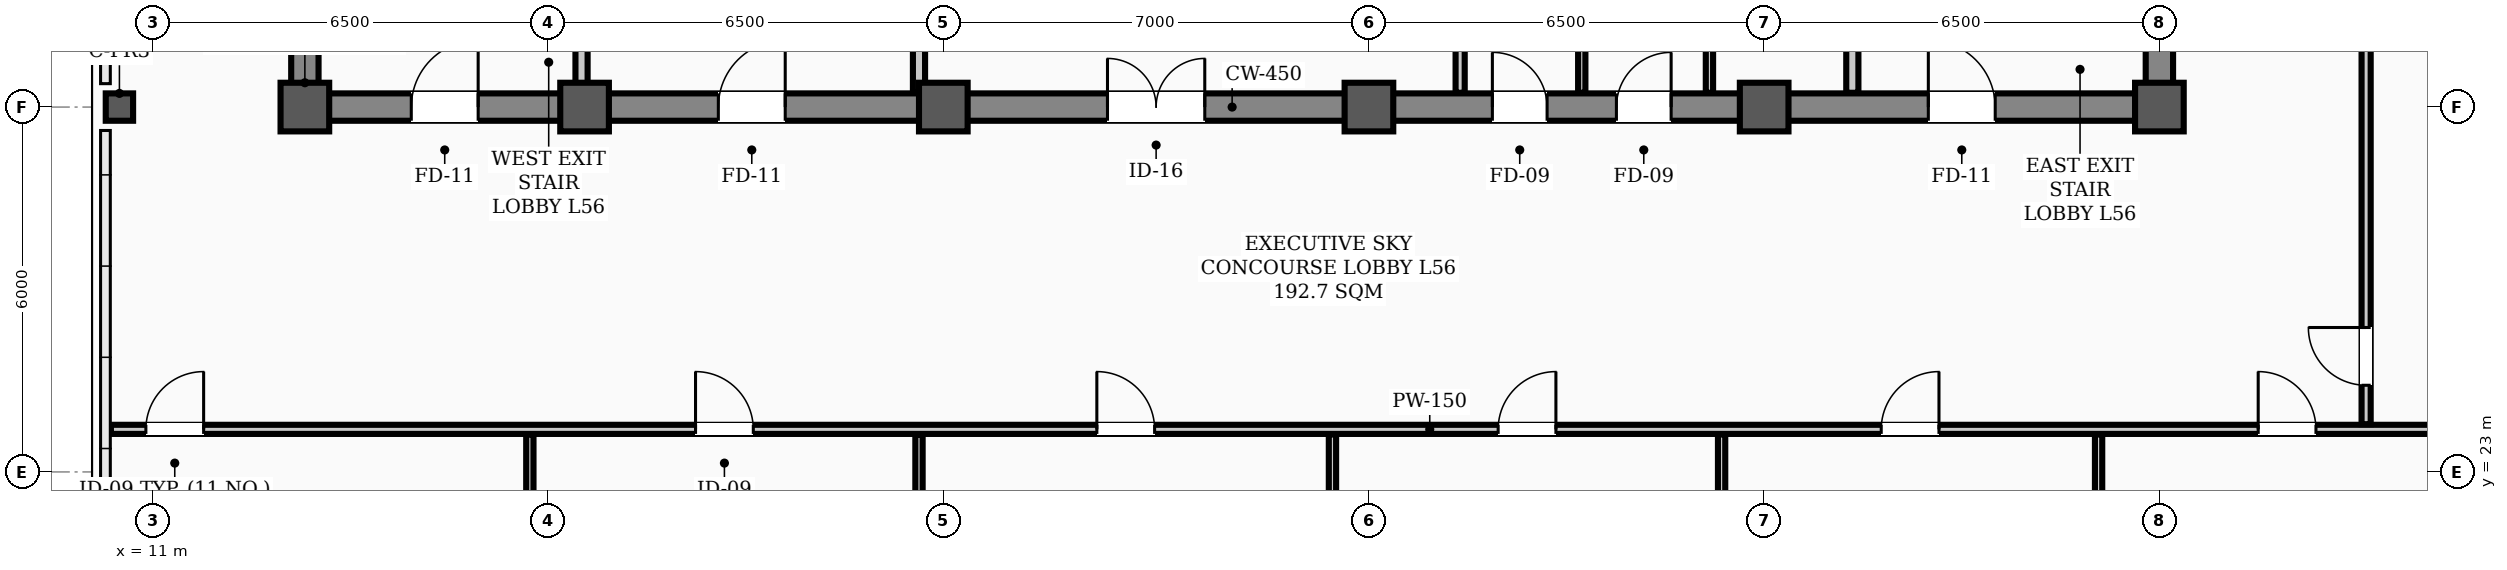
"""IFC4 building model, lengths in metres.
Left out: names, types, materials, properties, quantities, classifications, styles, units other than length and angle.
Written with IfcOpenShell. Run it as: python <this file> out.ifc"""

import sys

from ifc_helpers import new_model, si_unit, direction, frame, frame_2d, origin, origin_2d, place, context, subcontext, project, spatial, rectangle, hollow_rectangle, extrude, element, fill, save


model = new_model("IFC4")
c1 = context("Model", 3, precision=1e-05, world=origin(), true_north=direction((0.0, 1.0)))
c2 = subcontext(c1, "Body", "Model", "MODEL_VIEW")
j1 = project(units=[si_unit("LENGTHUNIT", "METRE"), si_unit("PLANEANGLEUNIT", "RADIAN")], contexts=[c1])
p1 = place(None, origin())
s1 = spatial("IfcSite", under=j1, at=p1, CompositionType="ELEMENT")
p2 = place(p1, origin())
s2 = spatial("IfcBuilding", under=s1, at=p2, CompositionType="ELEMENT")
p3 = place(p2, frame((0.0, 0.0, 226.7)))
s3 = spatial("IfcBuildingStorey", under=s2, at=p3, CompositionType="ELEMENT", Elevation=226.7)
for number, where, z_axis, x_axis in (
    (1, (13.5, 29.0, 0.0), (0.0, 0.0, 1.0), (1.0, 0.0, 0.0)),
    (2, (18.1, 29.0, 0.0), (0.0, 0.0, 1.0), (1.0, 0.0, 0.0)),
    (3, (24.0, 29.0, 0.0), (0.0, 0.0, 1.0), (1.0, 0.0, 0.0)),
    (4, (31.0, 29.0, 0.0), (0.0, 0.0, 1.0), (1.0, 0.0, 0.0)),
    (5, (37.5, 29.0, 0.0), (0.0, 0.0, 1.0), (1.0, 0.0, 0.0)),
    (6, (44.0, 29.0, 0.0), (0.0, 0.0, 1.0), (1.0, 0.0, 0.0)),
):
    element("IfcColumn", number, at=place(p3, frame(where, z_axis=z_axis, x_axis=x_axis)), inside=s3, PredefinedType="COLUMN", context=c2, shape_type="SweptSolid", body=[
        extrude(hollow_rectangle(XDim=0.8, YDim=0.8, WallThickness=0.032, InnerFilletRadius=0.016, OuterFilletRadius=0.048, at=origin_2d()), origin(), (0.0, 0.0, 1.0), 3.9),
    ])
p4 = place(p3, frame((10.45, 29.0, 0.0), z_axis=(0.0, 0.0, 1.0), x_axis=(1.0, 0.0, 0.0)))
e7 = element("IfcColumn", 7, at=p4, inside=s3, PredefinedType="COLUMN", context=c2, shape_type="SweptSolid", body=[
    extrude(hollow_rectangle(XDim=0.45, YDim=0.45, WallThickness=0.022, InnerFilletRadius=0.022, OuterFilletRadius=0.044, at=origin_2d()), origin(), (0.0, 0.0, 1.0), 3.9),
])
p5 = place(p3, frame((13.5, 29.0, 0.0), z_axis=(0.0, 0.0, 1.0), x_axis=(1.0, 0.0, 0.0)))
e8 = element("IfcWall", 8, at=p5, inside=s3, PredefinedType="SHEAR", context=c2, shape_type="SweptSolid", body=[
    extrude(rectangle(XDim=30.5, YDim=0.45, at=frame_2d((15.25, 0.0))), origin(), (0.0, 0.0, 1.0), 3.66),
])
p6 = place(p5, frame((1.75, 0.0, 0.0)))
e9 = element("IfcOpeningElement", 9, at=p6, cuts=e8, PredefinedType="OPENING", context=c2, shape_type="SweptSolid", body=[
    extrude(rectangle(XDim=1.1, YDim=2.08, at=frame_2d((0.55, 1.04))), frame((0.0, 0.235, 0.0), z_axis=(0.0, -1.0, 0.0), x_axis=(1.0, 0.0, 0.0)), (0.0, 0.0, 1.0), 0.47),
])
p7 = place(p5, frame((26.7, 0.0, 0.0)))
e10 = element("IfcOpeningElement", 10, at=p7, cuts=e8, PredefinedType="OPENING", context=c2, shape_type="SweptSolid", body=[
    extrude(rectangle(XDim=1.1, YDim=2.08, at=frame_2d((0.55, 1.04))), frame((0.0, 0.235, 0.0), z_axis=(0.0, -1.0, 0.0), x_axis=(1.0, 0.0, 0.0)), (0.0, 0.0, 1.0), 0.47),
])
p8 = place(p5, frame((6.8, 0.0, 0.0)))
e11 = element("IfcOpeningElement", 11, at=p8, cuts=e8, PredefinedType="OPENING", context=c2, shape_type="SweptSolid", body=[
    extrude(rectangle(XDim=1.1, YDim=2.08, at=frame_2d((0.55, 1.04))), frame((0.0, 0.235, 0.0), z_axis=(0.0, -1.0, 0.0), x_axis=(1.0, 0.0, 0.0)), (0.0, 0.0, 1.0), 0.47),
])
p9 = place(p5, frame((13.2, 0.0, 0.0)))
e12 = element("IfcOpeningElement", 12, at=p9, cuts=e8, PredefinedType="OPENING", context=c2, shape_type="SweptSolid", body=[
    extrude(rectangle(XDim=1.6, YDim=2.08, at=frame_2d((0.8, 1.04))), frame((0.0, 0.235, 0.0), z_axis=(0.0, -1.0, 0.0), x_axis=(1.0, 0.0, 0.0)), (0.0, 0.0, 1.0), 0.47),
])
p10 = place(p5, frame((19.53, 0.0, 0.0)))
e13 = element("IfcOpeningElement", 13, at=p10, cuts=e8, PredefinedType="OPENING", context=c2, shape_type="SweptSolid", body=[
    extrude(rectangle(XDim=0.9, YDim=2.08, at=frame_2d((0.45, 1.04))), frame((0.0, 0.235, 0.0), z_axis=(0.0, -1.0, 0.0), x_axis=(1.0, 0.0, 0.0)), (0.0, 0.0, 1.0), 0.47),
])
p11 = place(p5, frame((21.57, 0.0, 0.0)))
e14 = element("IfcOpeningElement", 14, at=p11, cuts=e8, PredefinedType="OPENING", context=c2, shape_type="SweptSolid", body=[
    extrude(rectangle(XDim=0.9, YDim=2.08, at=frame_2d((0.45, 1.04))), frame((0.0, 0.235, 0.0), z_axis=(0.0, -1.0, 0.0), x_axis=(1.0, 0.0, 0.0)), (0.0, 0.0, 1.0), 0.47),
])
for number, where, z_axis, x_axis in (
    (15, (13.5, 29.35, 0.0), (0.0, 0.0, 1.0), (0.0, 1.0, 0.0)),
    (16, (44.0, 29.35, 0.0), (0.0, 0.0, 1.0), (0.0, 1.0, 0.0)),
):
    element("IfcWall", number, at=place(p3, frame(where, z_axis=z_axis, x_axis=x_axis)), inside=s3, PredefinedType="SHEAR", context=c2, shape_type="SweptSolid", body=[
        extrude(rectangle(XDim=8.6, YDim=0.45, at=frame_2d((4.3, 0.0))), origin(), (0.0, 0.0, 1.0), 3.66),
    ])
p12 = place(p3, frame((10.31, 23.7, 0.0), z_axis=(0.0, 0.0, 1.0), x_axis=(1.0, 0.0, 0.0)))
e17 = element("IfcWall", 17, at=p12, inside=s3, PredefinedType="PARTITIONING", context=c2, shape_type="SweptSolid", body=[
    extrude(rectangle(XDim=43.38, YDim=0.15, at=frame_2d((21.69, 0.0))), origin(), (0.0, 0.0, 1.0), 2.24),
])
p13 = place(p12, frame((0.575, 0.0, 0.0)))
e18 = element("IfcOpeningElement", 18, at=p13, cuts=e17, PredefinedType="OPENING", context=c2, shape_type="SweptSolid", body=[
    extrude(rectangle(XDim=0.95, YDim=2.08, at=frame_2d((0.475, 1.04))), frame((0.0, 0.085, 0.0), z_axis=(0.0, -1.0, 0.0), x_axis=(1.0, 0.0, 0.0)), (0.0, 0.0, 1.0), 0.17),
])
p14 = place(p12, frame((9.615, 0.0, 0.0)))
e19 = element("IfcOpeningElement", 19, at=p14, cuts=e17, PredefinedType="OPENING", context=c2, shape_type="SweptSolid", body=[
    extrude(rectangle(XDim=0.95, YDim=2.08, at=frame_2d((0.475, 1.04))), frame((0.0, 0.085, 0.0), z_axis=(0.0, -1.0, 0.0), x_axis=(1.0, 0.0, 0.0)), (0.0, 0.0, 1.0), 0.17),
])
p15 = place(p12, frame((16.215, 0.0, 0.0)))
e20 = element("IfcOpeningElement", 20, at=p15, cuts=e17, PredefinedType="OPENING", context=c2, shape_type="SweptSolid", body=[
    extrude(rectangle(XDim=0.95, YDim=2.08, at=frame_2d((0.475, 1.04))), frame((0.0, 0.085, 0.0), z_axis=(0.0, -1.0, 0.0), x_axis=(1.0, 0.0, 0.0)), (0.0, 0.0, 1.0), 0.17),
])
p16 = place(p12, frame((22.815, 0.0, 0.0)))
e21 = element("IfcOpeningElement", 21, at=p16, cuts=e17, PredefinedType="OPENING", context=c2, shape_type="SweptSolid", body=[
    extrude(rectangle(XDim=0.95, YDim=2.08, at=frame_2d((0.475, 1.04))), frame((0.0, 0.085, 0.0), z_axis=(0.0, -1.0, 0.0), x_axis=(1.0, 0.0, 0.0)), (0.0, 0.0, 1.0), 0.17),
])
p17 = place(p12, frame((29.115, 0.0, 0.0)))
e22 = element("IfcOpeningElement", 22, at=p17, cuts=e17, PredefinedType="OPENING", context=c2, shape_type="SweptSolid", body=[
    extrude(rectangle(XDim=0.95, YDim=2.08, at=frame_2d((0.475, 1.04))), frame((0.0, 0.085, 0.0), z_axis=(0.0, -1.0, 0.0), x_axis=(1.0, 0.0, 0.0)), (0.0, 0.0, 1.0), 0.17),
])
p18 = place(p12, frame((35.315, 0.0, 0.0)))
e23 = element("IfcOpeningElement", 23, at=p18, cuts=e17, PredefinedType="OPENING", context=c2, shape_type="SweptSolid", body=[
    extrude(rectangle(XDim=0.95, YDim=2.08, at=frame_2d((0.475, 1.04))), frame((0.0, 0.085, 0.0), z_axis=(0.0, -1.0, 0.0), x_axis=(1.0, 0.0, 0.0)), (0.0, 0.0, 1.0), 0.17),
])
for number, where, z_axis, x_axis in (
    (24, (18.05, 29.235, 0.0), (0.0, 0.0, 1.0), (0.0, 1.0, 0.0)),
    (25, (38.95, 29.235, 0.0), (0.0, 0.0, 1.0), (0.0, 1.0, 0.0)),
):
    element("IfcWall", number, at=place(p3, frame(where, z_axis=z_axis, x_axis=x_axis)), inside=s3, PredefinedType="STANDARD", context=c2, shape_type="SweptSolid", body=[
        extrude(rectangle(XDim=1.065, YDim=0.2, at=frame_2d((0.532, 0.0))), origin(), (0.0, 0.0, 1.0), 2.24),
    ])
p19 = place(p3, frame((23.6, 29.235, 0.0), z_axis=(0.0, 0.0, 1.0), x_axis=(0.0, 1.0, 0.0)))
e26 = element("IfcWall", 26, at=p19, inside=s3, PredefinedType="STANDARD", context=c2, shape_type="SweptSolid", body=[
    extrude(rectangle(XDim=5.465, YDim=0.2, at=frame_2d((2.732, 0.0))), origin(), (0.0, 0.0, 1.0), 2.24),
])
p20 = place(p3, frame((32.5, 29.235, 0.0), z_axis=(0.0, 0.0, 1.0), x_axis=(0.0, 1.0, 0.0)))
e27 = element("IfcWall", 27, at=p20, inside=s3, PredefinedType="PARTITIONING", context=c2, shape_type="SweptSolid", body=[
    extrude(rectangle(XDim=2.53, YDim=0.15, at=frame_2d((1.265, 0.0))), origin(), (0.0, 0.0, 1.0), 2.24),
])
for number, where, z_axis, x_axis in (
    (28, (36.6, 29.235, 0.0), (0.0, 0.0, 1.0), (0.0, 1.0, 0.0)),
    (29, (34.5, 29.235, 0.0), (0.0, 0.0, 1.0), (0.0, 1.0, 0.0)),
):
    element("IfcWall", number, at=place(p3, frame(where, z_axis=z_axis, x_axis=x_axis)), inside=s3, PredefinedType="PARTITIONING", context=c2, shape_type="SweptSolid", body=[
        extrude(rectangle(XDim=2.53, YDim=0.12, at=frame_2d((1.265, 0.0))), origin(), (0.0, 0.0, 1.0), 2.24),
    ])
p21 = place(p3, frame((47.4, 23.785, 0.0), z_axis=(0.0, 0.0, 1.0), x_axis=(0.0, 1.0, 0.0)))
e30 = element("IfcWall", 30, at=p21, inside=s3, PredefinedType="PARTITIONING", context=c2, shape_type="SweptSolid", body=[
    extrude(rectangle(XDim=13.13, YDim=0.15, at=frame_2d((6.565, 0.0))), origin(), (0.0, 0.0, 1.0), 2.24),
])
p22 = place(p21, frame((0.64, 0.0, 0.0)))
e31 = element("IfcOpeningElement", 31, at=p22, cuts=e30, PredefinedType="OPENING", context=c2, shape_type="SweptSolid", body=[
    extrude(rectangle(XDim=0.95, YDim=2.08, at=frame_2d((0.475, 1.04))), frame((0.0, 0.085, 0.0), z_axis=(0.0, -1.0, 0.0), x_axis=(1.0, 0.0, 0.0)), (0.0, 0.0, 1.0), 0.17),
])
p23 = place(p21, frame((10.44, 0.0, 0.0)))
e32 = element("IfcOpeningElement", 32, at=p23, cuts=e30, PredefinedType="OPENING", context=c2, shape_type="SweptSolid", body=[
    extrude(rectangle(XDim=0.95, YDim=2.08, at=frame_2d((0.475, 1.04))), frame((0.0, 0.085, 0.0), z_axis=(0.0, -1.0, 0.0), x_axis=(1.0, 0.0, 0.0)), (0.0, 0.0, 1.0), 0.17),
])
p24 = place(p3, frame((17.2, 11.56, 0.0), z_axis=(0.0, 0.0, 1.0), x_axis=(0.0, 1.0, 0.0)))
e33 = element("IfcWall", 33, at=p24, inside=s3, PredefinedType="PARTITIONING", context=c2, shape_type="SweptSolid", body=[
    extrude(rectangle(XDim=12.055, YDim=0.12, at=frame_2d((6.027, 0.0))), origin(), (0.0, 0.0, 1.0), 2.24),
])
p25 = place(p3, frame((23.6, 13.32, 0.0), z_axis=(0.0, 0.0, 1.0), x_axis=(0.0, 1.0, 0.0)))
e34 = element("IfcWall", 34, at=p25, inside=s3, PredefinedType="PARTITIONING", context=c2, shape_type="SweptSolid", body=[
    extrude(rectangle(XDim=10.295, YDim=0.12, at=frame_2d((5.147, 0.0))), origin(), (0.0, 0.0, 1.0), 2.24),
])
for number, where, z_axis, x_axis in (
    (35, (30.4, 11.56, 0.0), (0.0, 0.0, 1.0), (0.0, 1.0, 0.0)),
    (36, (36.8, 11.56, 0.0), (0.0, 0.0, 1.0), (0.0, 1.0, 0.0)),
    (37, (43.0, 11.56, 0.0), (0.0, 0.0, 1.0), (0.0, 1.0, 0.0)),
):
    element("IfcWall", number, at=place(p3, frame(where, z_axis=z_axis, x_axis=x_axis)), inside=s3, PredefinedType="PARTITIONING", context=c2, shape_type="SweptSolid", body=[
        extrude(rectangle(XDim=12.055, YDim=0.12, at=frame_2d((6.027, 0.0))), origin(), (0.0, 0.0, 1.0), 2.24),
    ])
p26 = place(p6, origin())
e38 = element("IfcDoor", 38, at=p26, inside=s3, OperationType="SINGLE_SWING_RIGHT", PredefinedType="DOOR", context=c2, shape_type="SweptSolid", body=[
    extrude(rectangle(XDim=1.1, YDim=2.08, at=frame_2d((0.55, 1.04))), frame((0.0, 0.025, 0.0), z_axis=(0.0, -1.0, 0.0), x_axis=(1.0, 0.0, 0.0)), (0.0, 0.0, 1.0), 0.05),
])
fill(e9, e38)
p27 = place(p7, origin())
e39 = element("IfcDoor", 39, at=p27, inside=s3, OperationType="SINGLE_SWING_LEFT", PredefinedType="DOOR", context=c2, shape_type="SweptSolid", body=[
    extrude(rectangle(XDim=1.1, YDim=2.08, at=frame_2d((0.55, 1.04))), frame((0.0, 0.025, 0.0), z_axis=(0.0, -1.0, 0.0), x_axis=(1.0, 0.0, 0.0)), (0.0, 0.0, 1.0), 0.05),
])
fill(e10, e39)
p28 = place(p8, origin())
e40 = element("IfcDoor", 40, at=p28, inside=s3, OperationType="SINGLE_SWING_RIGHT", PredefinedType="DOOR", context=c2, shape_type="SweptSolid", body=[
    extrude(rectangle(XDim=1.1, YDim=2.08, at=frame_2d((0.55, 1.04))), frame((0.0, 0.025, 0.0), z_axis=(0.0, -1.0, 0.0), x_axis=(1.0, 0.0, 0.0)), (0.0, 0.0, 1.0), 0.05),
])
fill(e11, e40)
p29 = place(p9, origin())
e41 = element("IfcDoor", 41, at=p29, inside=s3, OperationType="DOUBLE_DOOR_SINGLE_SWING", PredefinedType="DOOR", context=c2, shape_type="SweptSolid", body=[
    extrude(rectangle(XDim=1.6, YDim=2.08, at=frame_2d((0.8, 1.04))), frame((0.0, 0.025, 0.0), z_axis=(0.0, -1.0, 0.0), x_axis=(1.0, 0.0, 0.0)), (0.0, 0.0, 1.0), 0.05),
])
fill(e12, e41)
p30 = place(p10, origin())
e42 = element("IfcDoor", 42, at=p30, inside=s3, OperationType="SINGLE_SWING_LEFT", PredefinedType="DOOR", context=c2, shape_type="SweptSolid", body=[
    extrude(rectangle(XDim=0.9, YDim=2.08, at=frame_2d((0.45, 1.04))), frame((0.0, 0.025, 0.0), z_axis=(0.0, -1.0, 0.0), x_axis=(1.0, 0.0, 0.0)), (0.0, 0.0, 1.0), 0.05),
])
fill(e13, e42)
p31 = place(p11, origin())
e43 = element("IfcDoor", 43, at=p31, inside=s3, OperationType="SINGLE_SWING_RIGHT", PredefinedType="DOOR", context=c2, shape_type="SweptSolid", body=[
    extrude(rectangle(XDim=0.9, YDim=2.08, at=frame_2d((0.45, 1.04))), frame((0.0, 0.025, 0.0), z_axis=(0.0, -1.0, 0.0), x_axis=(1.0, 0.0, 0.0)), (0.0, 0.0, 1.0), 0.05),
])
fill(e14, e43)
p32 = place(p13, origin())
e44 = element("IfcDoor", 44, at=p32, inside=s3, OperationType="SINGLE_SWING_RIGHT", PredefinedType="DOOR", context=c2, shape_type="SweptSolid", body=[
    extrude(rectangle(XDim=0.95, YDim=2.08, at=frame_2d((0.475, 1.04))), frame((0.0, 0.025, 0.0), z_axis=(0.0, -1.0, 0.0), x_axis=(1.0, 0.0, 0.0)), (0.0, 0.0, 1.0), 0.05),
])
fill(e18, e44)
p33 = place(p14, origin())
e45 = element("IfcDoor", 45, at=p33, inside=s3, OperationType="SINGLE_SWING_LEFT", PredefinedType="DOOR", context=c2, shape_type="SweptSolid", body=[
    extrude(rectangle(XDim=0.95, YDim=2.08, at=frame_2d((0.475, 1.04))), frame((0.0, 0.025, 0.0), z_axis=(0.0, -1.0, 0.0), x_axis=(1.0, 0.0, 0.0)), (0.0, 0.0, 1.0), 0.05),
])
fill(e19, e45)
p34 = place(p15, origin())
e46 = element("IfcDoor", 46, at=p34, inside=s3, OperationType="SINGLE_SWING_LEFT", PredefinedType="DOOR", context=c2, shape_type="SweptSolid", body=[
    extrude(rectangle(XDim=0.95, YDim=2.08, at=frame_2d((0.475, 1.04))), frame((0.0, 0.025, 0.0), z_axis=(0.0, -1.0, 0.0), x_axis=(1.0, 0.0, 0.0)), (0.0, 0.0, 1.0), 0.05),
])
fill(e20, e46)
p35 = place(p16, origin())
e47 = element("IfcDoor", 47, at=p35, inside=s3, OperationType="SINGLE_SWING_RIGHT", PredefinedType="DOOR", context=c2, shape_type="SweptSolid", body=[
    extrude(rectangle(XDim=0.95, YDim=2.08, at=frame_2d((0.475, 1.04))), frame((0.0, 0.025, 0.0), z_axis=(0.0, -1.0, 0.0), x_axis=(1.0, 0.0, 0.0)), (0.0, 0.0, 1.0), 0.05),
])
fill(e21, e47)
p36 = place(p17, origin())
e48 = element("IfcDoor", 48, at=p36, inside=s3, OperationType="SINGLE_SWING_RIGHT", PredefinedType="DOOR", context=c2, shape_type="SweptSolid", body=[
    extrude(rectangle(XDim=0.95, YDim=2.08, at=frame_2d((0.475, 1.04))), frame((0.0, 0.025, 0.0), z_axis=(0.0, -1.0, 0.0), x_axis=(1.0, 0.0, 0.0)), (0.0, 0.0, 1.0), 0.05),
])
fill(e22, e48)
p37 = place(p18, origin())
e49 = element("IfcDoor", 49, at=p37, inside=s3, OperationType="SINGLE_SWING_LEFT", PredefinedType="DOOR", context=c2, shape_type="SweptSolid", body=[
    extrude(rectangle(XDim=0.95, YDim=2.08, at=frame_2d((0.475, 1.04))), frame((0.0, 0.025, 0.0), z_axis=(0.0, -1.0, 0.0), x_axis=(1.0, 0.0, 0.0)), (0.0, 0.0, 1.0), 0.05),
])
fill(e23, e49)
p38 = place(p22, origin())
e50 = element("IfcDoor", 50, at=p38, inside=s3, OperationType="SINGLE_SWING_RIGHT", PredefinedType="DOOR", context=c2, shape_type="SweptSolid", body=[
    extrude(rectangle(XDim=0.95, YDim=2.08, at=frame_2d((0.475, 1.04))), frame((0.0, 0.025, 0.0), z_axis=(0.0, -1.0, 0.0), x_axis=(1.0, 0.0, 0.0)), (0.0, 0.0, 1.0), 0.05),
])
fill(e31, e50)
save(model, sys.argv[1])
